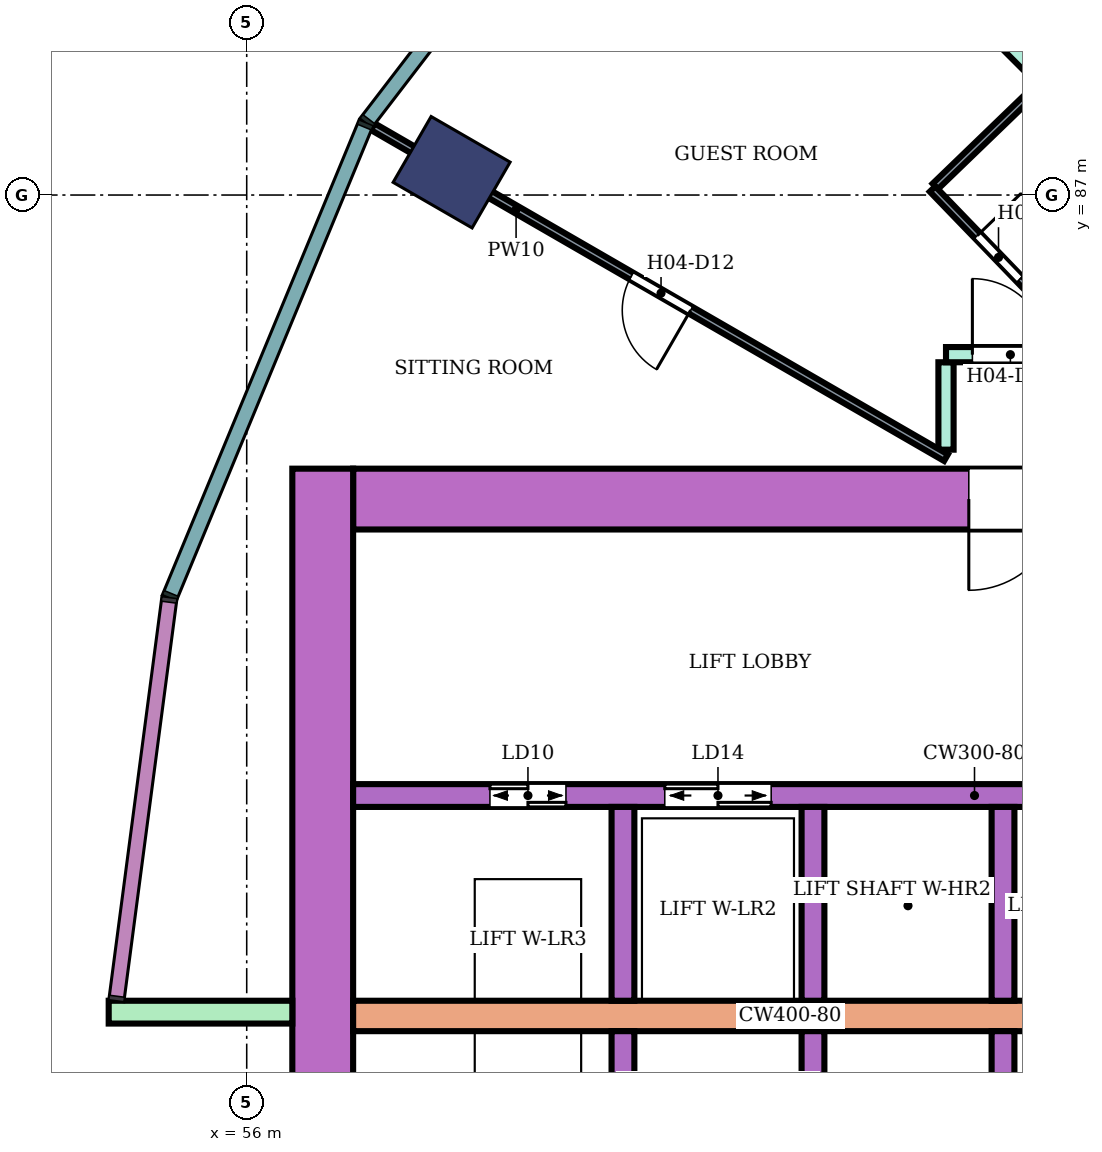
"""IFC4 building model, lengths in metres.
Left out: names, types, materials, properties, quantities, classifications, styles, units other than length and angle.
Written with IfcOpenShell. Run it as: python <this file> out.ifc"""

import sys

from ifc_helpers import new_model, si_unit, direction, frame, frame_2d, origin, origin_2d, place, context, subcontext, project, spatial, rectangle, extrude, element, fill, save


model = new_model("IFC4")
c1 = context("Model", 3, precision=1e-05, world=origin(), true_north=direction((0.0, 1.0)))
c2 = subcontext(c1, "Body", "Model", "MODEL_VIEW")
j1 = project(units=[si_unit("LENGTHUNIT", "METRE"), si_unit("PLANEANGLEUNIT", "RADIAN")], contexts=[c1])
p1 = place(None, origin())
s1 = spatial("IfcSite", under=j1, at=p1, CompositionType="ELEMENT")
p2 = place(p1, origin())
s2 = spatial("IfcBuilding", under=s1, at=p2, CompositionType="ELEMENT")
p3 = place(p2, frame((0.0, 0.0, 66.8)))
s3 = spatial("IfcBuildingStorey", under=s2, at=p3, CompositionType="ELEMENT", Elevation=66.8)
p4 = place(p3, frame((58.696, 87.3, 0.0), z_axis=(0.0, 0.0, 1.0), x_axis=(-0.866025403784, 0.5, 0.0)))
e1 = element("IfcColumn", 1, at=p4, inside=s3, PredefinedType="COLUMN", context=c2, shape_type="SweptSolid", body=[
    extrude(rectangle(XDim=1.2, YDim=1.0, at=origin_2d()), origin(), (0.0, 0.0, 1.0), 3.8),
])
p5 = place(p3, frame((72.1, 83.0, 0.0), z_axis=(0.0, 0.0, 1.0), x_axis=(-1.0, 0.0, 0.0)))
e2 = element("IfcWall", 2, at=p5, inside=s3, PredefinedType="SHEAR", context=c2, shape_type="SweptSolid", body=[
    extrude(rectangle(XDim=14.7, YDim=0.8, at=frame_2d((7.35, 0.0))), origin(), (0.0, 0.0, 1.0), 3.48),
])
p6 = place(p5, frame((4.2, 0.0, 0.0)))
e3 = element("IfcOpeningElement", 3, at=p6, cuts=e2, PredefinedType="OPENING", context=c2, shape_type="SweptSolid", body=[
    extrude(rectangle(XDim=2.4, YDim=2.4, at=frame_2d((1.2, 1.2))), frame((0.0, 0.41, 0.0), z_axis=(0.0, -1.0, 0.0), x_axis=(1.0, 0.0, 0.0)), (0.0, 0.0, 1.0), 0.82),
])
p7 = place(p3, frame((57.0, 83.4, 0.0), z_axis=(0.0, 0.0, 1.0), x_axis=(0.0, -1.0, 0.0)))
e4 = element("IfcWall", 4, at=p7, inside=s3, PredefinedType="SHEAR", context=c2, shape_type="SweptSolid", body=[
    extrude(rectangle(XDim=16.8, YDim=0.8, at=frame_2d((8.4, 0.0))), origin(), (0.0, 0.0, 1.0), 3.48),
])
p8 = place(p3, frame((68.3, 76.2, 0.0), z_axis=(0.0, 0.0, 1.0), x_axis=(-1.0, 0.0, 0.0)))
e5 = element("IfcWall", 5, at=p8, inside=s3, PredefinedType="SHEAR", context=c2, shape_type="SweptSolid", body=[
    extrude(rectangle(XDim=10.9, YDim=0.4, at=frame_2d((5.45, 0.0))), origin(), (0.0, 0.0, 1.0), 3.48),
])
p9 = place(p3, frame((68.3, 79.1, 0.0), z_axis=(0.0, 0.0, 1.0), x_axis=(-1.0, 0.0, 0.0)))
e6 = element("IfcWall", 6, at=p9, inside=s3, PredefinedType="SHEAR", context=c2, shape_type="SweptSolid", body=[
    extrude(rectangle(XDim=10.9, YDim=0.3, at=frame_2d((5.45, 0.0))), origin(), (0.0, 0.0, 1.0), 3.48),
])
p10 = place(p9, frame((0.4, 0.0, 0.0)))
e7 = element("IfcOpeningElement", 7, at=p10, cuts=e6, PredefinedType="OPENING", context=c2, shape_type="SweptSolid", body=[
    extrude(rectangle(XDim=1.4, YDim=2.1, at=frame_2d((0.7, 1.05))), frame((0.0, 0.16, 0.0), z_axis=(0.0, -1.0, 0.0), x_axis=(1.0, 0.0, 0.0)), (0.0, 0.0, 1.0), 0.32),
])
p11 = place(p9, frame((5.4, 0.0, 0.0)))
e8 = element("IfcOpeningElement", 8, at=p11, cuts=e6, PredefinedType="OPENING", context=c2, shape_type="SweptSolid", body=[
    extrude(rectangle(XDim=1.4, YDim=2.1, at=frame_2d((0.7, 1.05))), frame((0.0, 0.16, 0.0), z_axis=(0.0, -1.0, 0.0), x_axis=(1.0, 0.0, 0.0)), (0.0, 0.0, 1.0), 0.32),
])
p12 = place(p9, frame((8.1, 0.0, 0.0)))
e9 = element("IfcOpeningElement", 9, at=p12, cuts=e6, PredefinedType="OPENING", context=c2, shape_type="SweptSolid", body=[
    extrude(rectangle(XDim=1.0, YDim=2.1, at=frame_2d((0.5, 1.05))), frame((0.0, 0.16, 0.0), z_axis=(0.0, -1.0, 0.0), x_axis=(1.0, 0.0, 0.0)), (0.0, 0.0, 1.0), 0.32),
])
for number, where, z_axis, x_axis in (
    (10, (65.95, 76.0, 0.0), (0.0, 0.0, 1.0), (0.0, -1.0, 0.0)),
    (11, (63.45, 76.0, 0.0), (0.0, 0.0, 1.0), (0.0, -1.0, 0.0)),
    (12, (60.95, 76.0, 0.0), (0.0, 0.0, 1.0), (0.0, -1.0, 0.0)),
    (13, (65.95, 78.95, 0.0), (0.0, 0.0, 1.0), (0.0, -1.0, 0.0)),
    (14, (63.45, 78.95, 0.0), (0.0, 0.0, 1.0), (0.0, -1.0, 0.0)),
    (15, (60.95, 78.95, 0.0), (0.0, 0.0, 1.0), (0.0, -1.0, 0.0)),
):
    element("IfcWall", number, at=place(p3, frame(where, z_axis=z_axis, x_axis=x_axis)), inside=s3, PredefinedType="SHEAR", context=c2, shape_type="SweptSolid", body=[
        extrude(rectangle(XDim=2.55, YDim=0.3, at=frame_2d((1.275, 0.0))), origin(), (0.0, 0.0, 1.0), 3.48),
    ])
p13 = place(p3, frame((56.6, 76.25, 0.0), z_axis=(0.0, 0.0, 1.0), x_axis=(-1.0, 0.0, 0.0)))
e16 = element("IfcWall", 16, at=p13, inside=s3, PredefinedType="NOTDEFINED", context=c2, shape_type="SweptSolid", body=[
    extrude(rectangle(XDim=2.416, YDim=0.3, at=frame_2d((1.208, 0.0))), origin(), (0.0, 0.0, 1.0), 3.8),
])
p14 = place(p3, frame((63.598, 91.407, 0.0), z_axis=(0.0, 0.0, 1.0), x_axis=(0.706981202484, -0.707232337591, 0.0)))
e17 = element("IfcWall", 17, at=p14, inside=s3, PredefinedType="PARTITIONING", context=c2, shape_type="SweptSolid", body=[
    extrude(rectangle(XDim=6.805, YDim=0.2, at=frame_2d((3.402, 0.0))), origin(), (0.0, 0.0, 1.0), 3.35),
])
p15 = place(p3, frame((65.2, 83.65, 0.0), z_axis=(0.0, 0.0, 1.0), x_axis=(0.0, 1.0, 0.0)))
e18 = element("IfcWall", 18, at=p15, inside=s3, PredefinedType="PARTITIONING", context=c2, shape_type="SweptSolid", body=[
    extrude(rectangle(XDim=1.15, YDim=0.2, at=frame_2d((0.575, 0.0))), origin(), (0.0, 0.0, 1.0), 3.35),
])
p16 = place(p3, frame((65.2, 84.9, 0.0), z_axis=(0.0, 0.0, 1.0), x_axis=(1.0, 0.0, 0.0)))
e19 = element("IfcWall", 19, at=p16, inside=s3, PredefinedType="PARTITIONING", context=c2, shape_type="SweptSolid", body=[
    extrude(rectangle(XDim=1.537, YDim=0.2, at=frame_2d((0.769, 0.0))), origin(), (0.0, 0.0, 1.0), 3.35),
])
p17 = place(p16, frame((0.347, 0.0, 0.0)))
e20 = element("IfcOpeningElement", 20, at=p17, cuts=e19, PredefinedType="OPENING", context=c2, shape_type="SweptSolid", body=[
    extrude(rectangle(XDim=1.0, YDim=2.1, at=frame_2d((0.5, 1.05))), frame((0.0, 0.11, 0.0), z_axis=(0.0, -1.0, 0.0), x_axis=(1.0, 0.0, 0.0)), (0.0, 0.0, 1.0), 0.22),
])
p18 = place(p3, frame((57.659, 87.899, 0.0), z_axis=(0.0, 0.0, 1.0), x_axis=(0.86602264145, -0.500004784474, 0.0)))
e21 = element("IfcWall", 21, at=p18, inside=s3, PredefinedType="PARTITIONING", context=c2, shape_type="SweptSolid", body=[
    extrude(rectangle(XDim=8.708, YDim=0.1, at=frame_2d((4.354, 0.0))), origin(), (0.0, 0.0, 1.0), 3.35),
])
p19 = place(p18, frame((3.929, 0.0, 0.0)))
e22 = element("IfcOpeningElement", 22, at=p19, cuts=e21, PredefinedType="OPENING", context=c2, shape_type="SweptSolid", body=[
    extrude(rectangle(XDim=0.9, YDim=2.1, at=frame_2d((0.45, 1.05))), frame((0.0, 0.06, 0.0), z_axis=(0.0, -1.0, 0.0), x_axis=(1.0, 0.0, 0.0)), (0.0, 0.0, 1.0), 0.12),
])
p20 = place(p3, frame((65.059, 87.114, 0.0), z_axis=(0.0, 0.0, 1.0), x_axis=(0.719715847356, 0.694268751324, 0.0)))
e23 = element("IfcWall", 23, at=p20, inside=s3, PredefinedType="PARTITIONING", context=c2, shape_type="SweptSolid", body=[
    extrude(rectangle(XDim=1.9, YDim=0.1, at=frame_2d((0.95, 0.0))), origin(), (0.0, 0.0, 1.0), 3.35),
])
p21 = place(p3, frame((65.023, 87.079, 0.0), z_axis=(0.0, 0.0, 1.0), x_axis=(0.694287838235, -0.719697434815, 0.0)))
e24 = element("IfcWall", 24, at=p21, inside=s3, PredefinedType="PARTITIONING", context=c2, shape_type="SweptSolid", body=[
    extrude(rectangle(XDim=2.7, YDim=0.1, at=frame_2d((1.35, 0.0))), origin(), (0.0, 0.0, 1.0), 3.35),
])
p22 = place(p21, frame((0.85, 0.0, 0.0)))
e25 = element("IfcOpeningElement", 25, at=p22, cuts=e24, PredefinedType="OPENING", context=c2, shape_type="SweptSolid", body=[
    extrude(rectangle(XDim=0.8, YDim=2.1, at=frame_2d((0.4, 1.05))), frame((0.0, 0.06, 0.0), z_axis=(0.0, -1.0, 0.0), x_axis=(1.0, 0.0, 0.0)), (0.0, 0.0, 1.0), 0.12),
])
p23 = place(p17, origin())
e26 = element("IfcDoor", 26, at=p23, inside=s3, OperationType="SINGLE_SWING_LEFT", PredefinedType="DOOR", context=c2, shape_type="SweptSolid", body=[
    extrude(rectangle(XDim=1.0, YDim=2.1, at=frame_2d((0.5, 1.05))), frame((0.0, 0.025, 0.0), z_axis=(0.0, -1.0, 0.0), x_axis=(1.0, 0.0, 0.0)), (0.0, 0.0, 1.0), 0.05),
])
fill(e20, e26)
p24 = place(p22, origin())
e27 = element("IfcDoor", 27, at=p24, inside=s3, OperationType="SINGLE_SWING_LEFT", PredefinedType="DOOR", context=c2, shape_type="SweptSolid", body=[
    extrude(rectangle(XDim=0.8, YDim=2.1, at=frame_2d((0.4, 1.05))), frame((0.0, 0.025, 0.0), z_axis=(0.0, -1.0, 0.0), x_axis=(1.0, 0.0, 0.0)), (0.0, 0.0, 1.0), 0.05),
])
fill(e25, e27)
p25 = place(p19, frame((0.9, 0.0, 0.0), z_axis=(0.0, 0.0, 1.0), x_axis=(-1.0, 0.0, 0.0)))
e28 = element("IfcDoor", 28, at=p25, inside=s3, OperationType="SINGLE_SWING_LEFT", PredefinedType="DOOR", context=c2, shape_type="SweptSolid", body=[
    extrude(rectangle(XDim=0.9, YDim=2.1, at=frame_2d((0.45, 1.05))), frame((0.0, 0.025, 0.0), z_axis=(0.0, -1.0, 0.0), x_axis=(1.0, 0.0, 0.0)), (0.0, 0.0, 1.0), 0.05),
])
fill(e22, e28)
p26 = place(p11, origin())
e29 = element("IfcDoor", 29, at=p26, inside=s3, OperationType="DOUBLE_DOOR_SLIDING", PredefinedType="DOOR", context=c2, shape_type="SweptSolid", body=[
    extrude(rectangle(XDim=1.4, YDim=2.1, at=frame_2d((0.7, 1.05))), frame((0.0, 0.025, 0.0), z_axis=(0.0, -1.0, 0.0), x_axis=(1.0, 0.0, 0.0)), (0.0, 0.0, 1.0), 0.05),
])
fill(e8, e29)
p27 = place(p12, origin())
e30 = element("IfcDoor", 30, at=p27, inside=s3, OperationType="DOUBLE_DOOR_SLIDING", PredefinedType="DOOR", context=c2, shape_type="SweptSolid", body=[
    extrude(rectangle(XDim=1.0, YDim=2.1, at=frame_2d((0.5, 1.05))), frame((0.0, 0.025, 0.0), z_axis=(0.0, -1.0, 0.0), x_axis=(1.0, 0.0, 0.0)), (0.0, 0.0, 1.0), 0.05),
])
fill(e9, e30)
p28 = place(p6, origin())
e31 = element("IfcDoor", 31, at=p28, inside=s3, OperationType="DOUBLE_DOOR_SINGLE_SWING", PredefinedType="DOOR", context=c2, shape_type="SweptSolid", body=[
    extrude(rectangle(XDim=2.4, YDim=2.4, at=frame_2d((1.2, 1.2))), frame((0.0, 0.025, 0.0), z_axis=(0.0, -1.0, 0.0), x_axis=(1.0, 0.0, 0.0)), (0.0, 0.0, 1.0), 0.05),
])
fill(e3, e31)
save(model, sys.argv[1])
